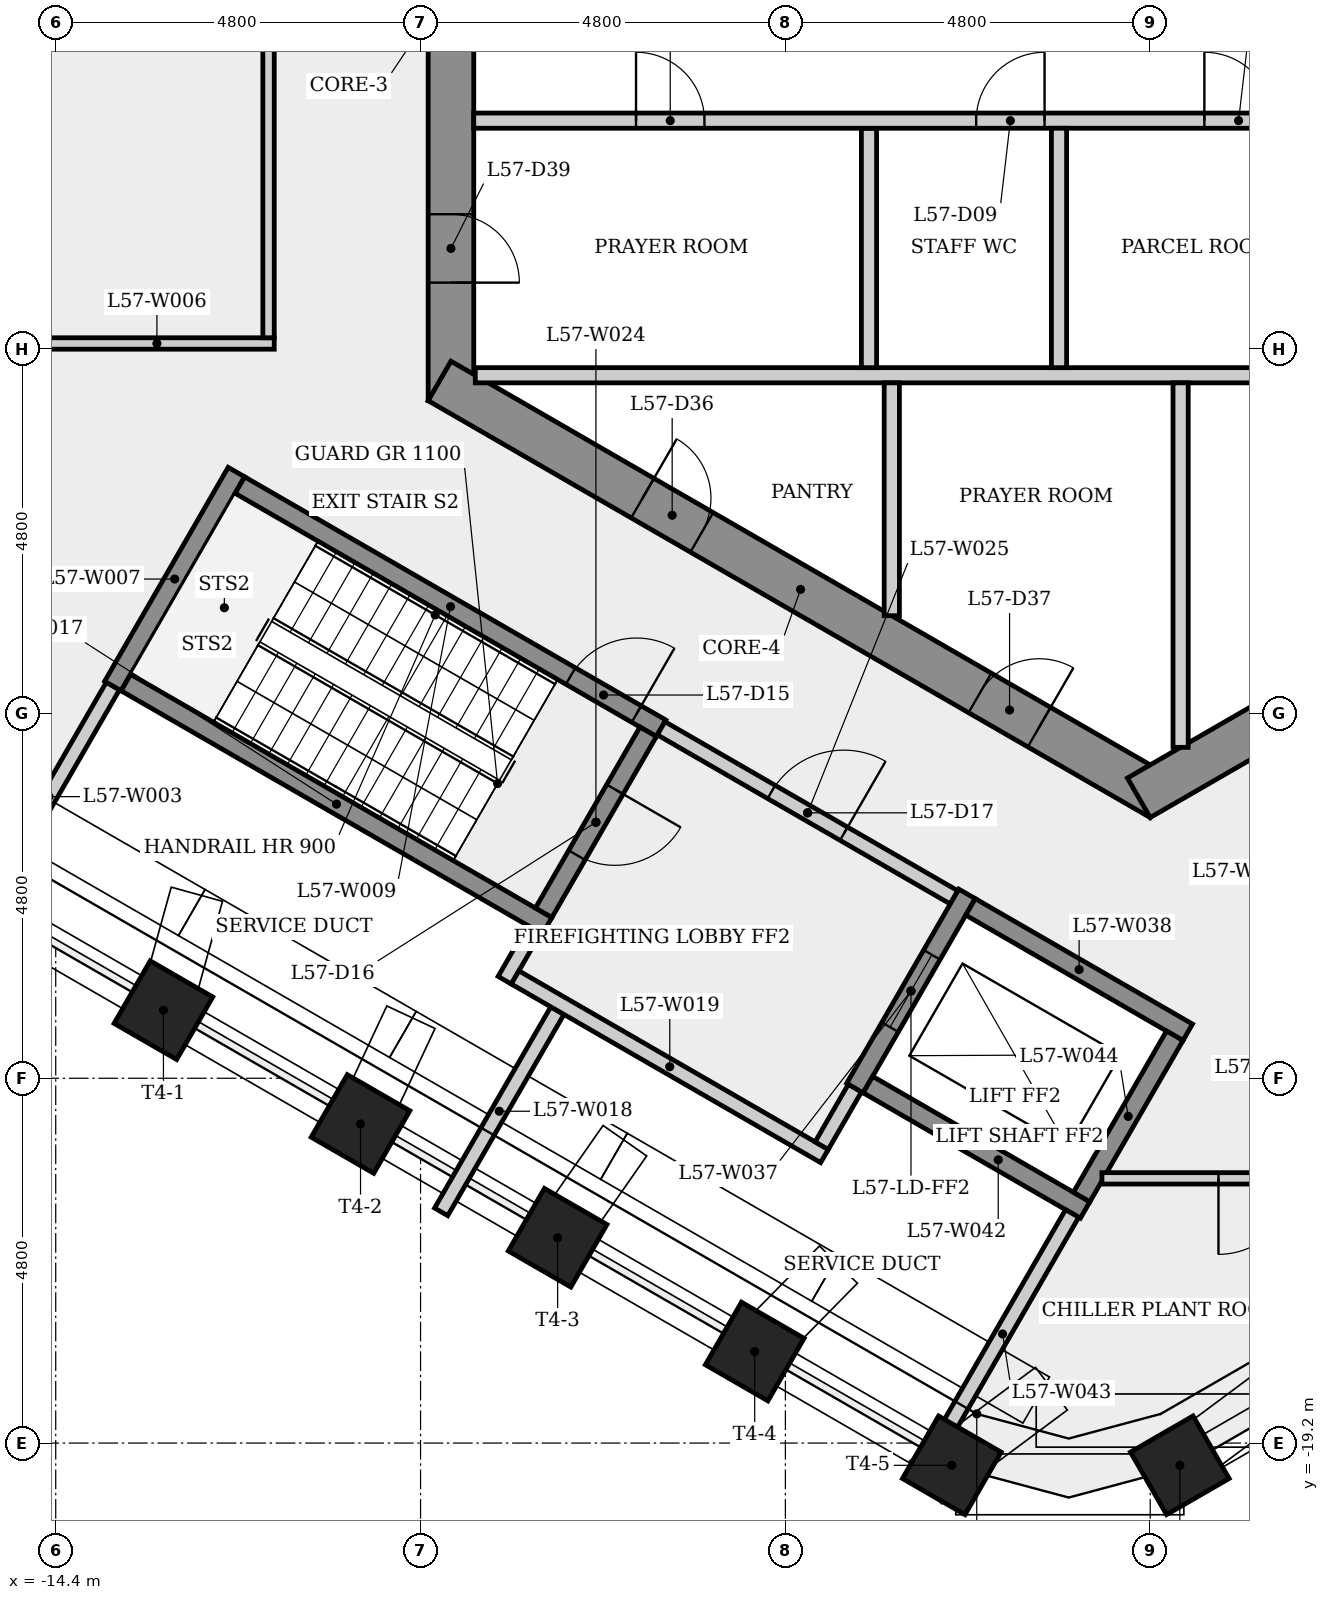
"""IFC4 building model, lengths in metres.
Left out: names, types, materials, properties, quantities, classifications, styles, units other than length and angle.
Written with IfcOpenShell. Run it as: python <this file> out.ifc"""

import sys

from ifc_helpers import new_model, si_unit, direction, frame, frame_2d, origin, origin_2d, place, context, subcontext, project, spatial, rectangle, extrude, element, fill, save


model = new_model("IFC4")
c1 = context("Model", 3, precision=1e-05, world=origin(), true_north=direction((0.0, 1.0)))
c2 = subcontext(c1, "Body", "Model", "MODEL_VIEW")
j1 = project(units=[si_unit("LENGTHUNIT", "METRE"), si_unit("PLANEANGLEUNIT", "RADIAN")], contexts=[c1])
p1 = place(None, origin())
s1 = spatial("IfcSite", under=j1, at=p1, CompositionType="ELEMENT")
p2 = place(p1, origin())
s2 = spatial("IfcBuilding", under=s1, at=p2, CompositionType="ELEMENT")
p3 = place(p2, frame((0.0, 0.0, 214.1)))
s3 = spatial("IfcBuildingStorey", under=s2, at=p3, CompositionType="ELEMENT", Elevation=214.1)
p4 = place(p3, frame((-9.2, 5.485, 0.0), z_axis=(0.0, 0.0, 1.0), x_axis=(0.0, -1.0, 0.0)))
e1 = element("IfcWall", 1, at=p4, inside=s3, PredefinedType="SHEAR", context=c2, shape_type="SweptSolid", body=[
    extrude(rectangle(XDim=10.97, YDim=0.6, at=frame_2d((5.485, 0.0))), origin(), (0.0, 0.0, 1.0), 4.8),
])
p5 = place(p4, frame((8.516, 0.0, 0.0)))
e2 = element("IfcOpeningElement", 2, at=p5, cuts=e1, PredefinedType="OPENING", context=c2, shape_type="SweptSolid", body=[
    extrude(rectangle(XDim=0.9, YDim=2.1, at=frame_2d((0.45, 1.05))), frame((0.0, 0.31, 0.0), z_axis=(0.0, -1.0, 0.0), x_axis=(1.0, 0.0, 0.0)), (0.0, 0.0, 1.0), 0.62),
])
p6 = place(p4, frame((4.685, 0.0, 0.0)))
e3 = element("IfcOpeningElement", 3, at=p6, cuts=e1, PredefinedType="OPENING", context=c2, shape_type="SweptSolid", body=[
    extrude(rectangle(XDim=1.6, YDim=2.1, at=frame_2d((0.8, 1.05))), frame((0.0, 0.31, 0.0), z_axis=(0.0, -1.0, 0.0), x_axis=(1.0, 0.0, 0.0)), (0.0, 0.0, 1.0), 0.62),
])
p7 = place(p3, frame((-9.35, -5.225, 0.0), z_axis=(0.0, 0.0, 1.0), x_axis=(0.866023993627, -0.500002442456, 0.0)))
e4 = element("IfcWall", 4, at=p7, inside=s3, PredefinedType="SHEAR", context=c2, shape_type="SweptSolid", body=[
    extrude(rectangle(XDim=10.97, YDim=0.6, at=frame_2d((5.485, 0.0))), origin(), (0.0, 0.0, 1.0), 4.8),
])
p8 = place(p7, frame((3.084, 0.0, 0.0)))
e5 = element("IfcOpeningElement", 5, at=p8, cuts=e4, PredefinedType="OPENING", context=c2, shape_type="SweptSolid", body=[
    extrude(rectangle(XDim=0.9, YDim=2.1, at=frame_2d((0.45, 1.05))), frame((0.0, 0.31, 0.0), z_axis=(0.0, -1.0, 0.0), x_axis=(1.0, 0.0, 0.0)), (0.0, 0.0, 1.0), 0.62),
])
p9 = place(p7, frame((8.21, 0.0, 0.0)))
e6 = element("IfcOpeningElement", 6, at=p9, cuts=e4, PredefinedType="OPENING", context=c2, shape_type="SweptSolid", body=[
    extrude(rectangle(XDim=0.9, YDim=2.1, at=frame_2d((0.45, 1.05))), frame((0.0, 0.31, 0.0), z_axis=(0.0, -1.0, 0.0), x_axis=(1.0, 0.0, 0.0)), (0.0, 0.0, 1.0), 0.62),
])
p10 = place(p3, frame((-0.15, -10.71, 0.0), z_axis=(0.0, 0.0, 1.0), x_axis=(0.866023993627, 0.500002442456, 0.0)))
e7 = element("IfcWall", 7, at=p10, inside=s3, PredefinedType="SHEAR", context=c2, shape_type="SweptSolid", body=[
    extrude(rectangle(XDim=10.97, YDim=0.6, at=frame_2d((5.485, 0.0))), origin(), (0.0, 0.0, 1.0), 4.8),
])
p11 = place(p10, frame((6.935, 0.0, 0.0)))
e8 = element("IfcOpeningElement", 8, at=p11, cuts=e7, PredefinedType="OPENING", context=c2, shape_type="SweptSolid", body=[
    extrude(rectangle(XDim=0.9, YDim=2.1, at=frame_2d((0.45, 1.05))), frame((0.0, 0.31, 0.0), z_axis=(0.0, -1.0, 0.0), x_axis=(1.0, 0.0, 0.0)), (0.0, 0.0, 1.0), 0.62),
])
for number, where, z_axis, x_axis in (
    (9, (-12.983, -13.504, 0.0), (0.0, 0.0, 1.0), (-0.5, -0.866, 0.0)),
    (10, (-10.39, -15.001, 0.0), (0.0, 0.0, 1.0), (-0.5, -0.866, 0.0)),
    (11, (-7.797, -16.499, 0.0), (0.0, 0.0, 1.0), (-0.5, -0.866, 0.0)),
    (12, (-5.204, -17.996, 0.0), (0.0, 0.0, 1.0), (-0.5, -0.866, 0.0)),
    (13, (-2.611, -19.493, 0.0), (0.0, 0.0, 1.0), (-0.5, -0.866, 0.0)),
    (14, (0.389, -19.493, 0.0), (0.0, 0.0, 1.0), (0.5, -0.866, 0.0)),
):
    element("IfcColumn", number, at=place(p3, frame(where, z_axis=z_axis, x_axis=x_axis)), inside=s3, PredefinedType="COLUMN", context=c2, shape_type="SweptSolid", body=[
        extrude(rectangle(XDim=0.95, YDim=0.95, at=origin_2d()), origin(), (0.0, 0.0, 1.0), 4.45),
    ])
p12 = place(p3, frame((-15.329, -12.15, 0.0), z_axis=(0.0, 0.0, 1.0), x_axis=(0.49998231768, 0.866035612436, 0.0)))
e15 = element("IfcWall", 15, at=p12, inside=s3, PredefinedType="PLUMBINGWALL", context=c2, shape_type="SweptSolid", body=[
    extrude(rectangle(XDim=3.361, YDim=0.2, at=frame_2d((1.681, 0.0))), origin(), (0.0, 0.0, 1.0), 4.45),
])
p13 = place(p3, frame((-14.612, -4.732, 0.0), z_axis=(0.0, 0.0, 1.0), x_axis=(1.0, 0.0, 0.0)))
e16 = element("IfcWall", 16, at=p13, inside=s3, PredefinedType="PARTITIONING", context=c2, shape_type="SweptSolid", body=[
    extrude(rectangle(XDim=3.087, YDim=0.15, at=frame_2d((1.544, 0.0))), origin(), (0.0, 0.0, 1.0), 4.45),
])
p14 = place(p3, frame((-13.648, -9.239, 0.0), z_axis=(0.0, 0.0, 1.0), x_axis=(0.500017246033, 0.866015446554, 0.0)))
e17 = element("IfcWall", 17, at=p14, inside=s3, PredefinedType="SHEAR", context=c2, shape_type="SweptSolid", body=[
    extrude(rectangle(XDim=3.25, YDim=0.25, at=frame_2d((1.625, 0.0))), origin(), (0.0, 0.0, 1.0), 4.45),
])
p15 = place(p3, frame((-11.977, -6.595, 0.0), z_axis=(0.0, 0.0, 1.0), x_axis=(0.866025499775, -0.499999833739, 0.0)))
e18 = element("IfcWall", 18, at=p15, inside=s3, PredefinedType="SHEAR", context=c2, shape_type="SweptSolid", body=[
    extrude(rectangle(XDim=6.4, YDim=0.25, at=frame_2d((3.2, 0.0))), origin(), (0.0, 0.0, 1.0), 4.45),
])
p16 = place(p15, frame((5.025, 0.0, 0.0)))
e19 = element("IfcOpeningElement", 19, at=p16, cuts=e18, PredefinedType="OPENING", context=c2, shape_type="SweptSolid", body=[
    extrude(rectangle(XDim=1.0, YDim=2.1, at=frame_2d((0.5, 1.05))), frame((0.0, 0.135, 0.0), z_axis=(0.0, -1.0, 0.0), x_axis=(1.0, 0.0, 0.0)), (0.0, 0.0, 1.0), 0.27),
])
p17 = place(p3, frame((-11.6, -4.657, 0.0), z_axis=(0.0, 0.0, 1.0), x_axis=(0.0, 1.0, 0.0)))
e20 = element("IfcWall", 20, at=p17, inside=s3, PredefinedType="PARTITIONING", context=c2, shape_type="SweptSolid", body=[
    extrude(rectangle(XDim=10.214, YDim=0.15, at=frame_2d((5.107, 0.0))), origin(), (0.0, 0.0, 1.0), 4.45),
])
p18 = place(p17, frame((5.698, 0.0, 0.0)))
e21 = element("IfcOpeningElement", 21, at=p18, cuts=e20, PredefinedType="OPENING", context=c2, shape_type="SweptSolid", body=[
    extrude(rectangle(XDim=1.6, YDim=2.1, at=frame_2d((0.8, 1.05))), frame((0.0, 0.085, 0.0), z_axis=(0.0, -1.0, 0.0), x_axis=(1.0, 0.0, 0.0)), (0.0, 0.0, 1.0), 0.17),
])
p19 = place(p3, frame((-8.88, -5.15, 0.0), z_axis=(0.0, 0.0, 1.0), x_axis=(1.0, 0.0, 0.0)))
e22 = element("IfcWall", 22, at=p19, inside=s3, PredefinedType="PARTITIONING", context=c2, shape_type="SweptSolid", body=[
    extrude(rectangle(XDim=11.205, YDim=0.2, at=frame_2d((5.603, 0.0))), origin(), (0.0, 0.0, 1.0), 4.45),
])
p20 = place(p3, frame((-8.493, -13.11, 0.0), z_axis=(0.0, 0.0, 1.0), x_axis=(0.500067724834, 0.865986299303, 0.0)))
e23 = element("IfcWall", 23, at=p20, inside=s3, PredefinedType="PLUMBINGWALL", context=c2, shape_type="SweptSolid", body=[
    extrude(rectangle(XDim=0.775, YDim=0.2, at=frame_2d((0.388, 0.0))), origin(), (0.0, 0.0, 1.0), 4.45),
])
p21 = place(p3, frame((-7.935, -12.393, 0.0), z_axis=(0.0, 0.0, 1.0), x_axis=(-0.866025499775, 0.499999833739, 0.0)))
e24 = element("IfcWall", 24, at=p21, inside=s3, PredefinedType="SHEAR", context=c2, shape_type="SweptSolid", body=[
    extrude(rectangle(XDim=6.4, YDim=0.25, at=frame_2d((3.2, 0.0))), origin(), (0.0, 0.0, 1.0), 4.45),
])
p22 = place(p3, frame((-7.8, -13.51, 0.0), z_axis=(0.0, 0.0, 1.0), x_axis=(-0.500003532061, -0.866023364538, 0.0)))
e25 = element("IfcWall", 25, at=p22, inside=s3, PredefinedType="PLUMBINGWALL", context=c2, shape_type="SweptSolid", body=[
    extrude(rectangle(XDim=3.058, YDim=0.2, at=frame_2d((1.529, 0.0))), origin(), (0.0, 0.0, 1.0), 4.45),
])
p23 = place(p3, frame((-8.356, -13.073, 0.0), z_axis=(0.0, 0.0, 1.0), x_axis=(0.866038532462, -0.499977259774, 0.0)))
e26 = element("IfcWall", 26, at=p23, inside=s3, PredefinedType="PLUMBINGWALL", context=c2, shape_type="SweptSolid", body=[
    extrude(rectangle(XDim=4.7, YDim=0.2, at=frame_2d((2.35, 0.0))), origin(), (0.0, 0.0, 1.0), 4.45),
])
p24 = place(p3, frame((-6.605, -9.841, 0.0), z_axis=(0.0, 0.0, 1.0), x_axis=(-0.499996545922, -0.866027397988, 0.0)))
e27 = element("IfcWall", 27, at=p24, inside=s3, PredefinedType="SHEAR", context=c2, shape_type="SweptSolid", body=[
    extrude(rectangle(XDim=2.75, YDim=0.25, at=frame_2d((1.375, 0.0))), origin(), (0.0, 0.0, 1.0), 4.45),
])
p25 = place(p24, frame((0.875, 0.0, 0.0)))
e28 = element("IfcOpeningElement", 28, at=p25, cuts=e27, PredefinedType="OPENING", context=c2, shape_type="SweptSolid", body=[
    extrude(rectangle(XDim=1.0, YDim=2.1, at=frame_2d((0.5, 1.05))), frame((0.0, 0.135, 0.0), z_axis=(0.0, -1.0, 0.0), x_axis=(1.0, 0.0, 0.0)), (0.0, 0.0, 1.0), 0.27),
])
p26 = place(p3, frame((-6.435, -9.795, 0.0), z_axis=(0.0, 0.0, 1.0), x_axis=(0.866012907634, -0.500021643343, 0.0)))
e29 = element("IfcWall", 29, at=p26, inside=s3, PredefinedType="PARTITIONING", context=c2, shape_type="SweptSolid", body=[
    extrude(rectangle(XDim=4.45, YDim=0.2, at=frame_2d((2.225, 0.0))), origin(), (0.0, 0.0, 1.0), 4.45),
])
p27 = place(p26, frame((1.675, 0.0, 0.0)))
e30 = element("IfcOpeningElement", 30, at=p27, cuts=e29, PredefinedType="OPENING", context=c2, shape_type="SweptSolid", body=[
    extrude(rectangle(XDim=1.1, YDim=2.1, at=frame_2d((0.55, 1.05))), frame((0.0, 0.11, 0.0), z_axis=(0.0, -1.0, 0.0), x_axis=(1.0, 0.0, 0.0)), (0.0, 0.0, 1.0), 0.22),
])
p28 = place(p3, frame((-3.885, -14.529, 0.0), z_axis=(0.0, 0.0, 1.0), x_axis=(-0.499859285417, -0.866106630146, 0.0)))
e31 = element("IfcWall", 31, at=p28, inside=s3, PredefinedType="PLUMBINGWALL", context=c2, shape_type="SweptSolid", body=[
    extrude(rectangle(XDim=0.875, YDim=0.2, at=frame_2d((0.438, 0.0))), origin(), (0.0, 0.0, 1.0), 4.45),
])
p29 = place(p3, frame((-3.7, -1.9, 0.0), z_axis=(0.0, 0.0, 1.0), x_axis=(0.0, -1.0, 0.0)))
e32 = element("IfcWall", 32, at=p29, inside=s3, PredefinedType="PARTITIONING", context=c2, shape_type="SweptSolid", body=[
    extrude(rectangle(XDim=3.15, YDim=0.2, at=frame_2d((1.575, 0.0))), origin(), (0.0, 0.0, 1.0), 4.45),
])
p30 = place(p3, frame((-8.9, -1.8, 0.0), z_axis=(0.0, 0.0, 1.0), x_axis=(1.0, 0.0, 0.0)))
e33 = element("IfcWall", 33, at=p30, inside=s3, PredefinedType="PARTITIONING", context=c2, shape_type="SweptSolid", body=[
    extrude(rectangle(XDim=11.225, YDim=0.2, at=frame_2d((5.613, 0.0))), origin(), (0.0, 0.0, 1.0), 4.45),
])
p31 = place(p30, frame((2.135, 0.0, 0.0)))
e34 = element("IfcOpeningElement", 34, at=p31, cuts=e33, PredefinedType="OPENING", context=c2, shape_type="SweptSolid", body=[
    extrude(rectangle(XDim=0.9, YDim=2.1, at=frame_2d((0.45, 1.05))), frame((0.0, 0.11, 0.0), z_axis=(0.0, -1.0, 0.0), x_axis=(1.0, 0.0, 0.0)), (0.0, 0.0, 1.0), 0.22),
])
p32 = place(p30, frame((6.61, 0.0, 0.0)))
e35 = element("IfcOpeningElement", 35, at=p32, cuts=e33, PredefinedType="OPENING", context=c2, shape_type="SweptSolid", body=[
    extrude(rectangle(XDim=0.9, YDim=2.1, at=frame_2d((0.45, 1.05))), frame((0.0, 0.11, 0.0), z_axis=(0.0, -1.0, 0.0), x_axis=(1.0, 0.0, 0.0)), (0.0, 0.0, 1.0), 0.22),
])
p33 = place(p30, frame((9.613, 0.0, 0.0)))
e36 = element("IfcOpeningElement", 36, at=p33, cuts=e33, PredefinedType="OPENING", context=c2, shape_type="SweptSolid", body=[
    extrude(rectangle(XDim=0.9, YDim=2.1, at=frame_2d((0.45, 1.05))), frame((0.0, 0.11, 0.0), z_axis=(0.0, -1.0, 0.0), x_axis=(1.0, 0.0, 0.0)), (0.0, 0.0, 1.0), 0.22),
])
p34 = place(p3, frame((-3.4, -5.25, 0.0), z_axis=(0.0, 0.0, 1.0), x_axis=(0.0, -1.0, 0.0)))
e37 = element("IfcWall", 37, at=p34, inside=s3, PredefinedType="PARTITIONING", context=c2, shape_type="SweptSolid", body=[
    extrude(rectangle(XDim=3.064, YDim=0.2, at=frame_2d((1.532, 0.0))), origin(), (0.0, 0.0, 1.0), 4.45),
])
p35 = place(p3, frame((-2.41, -11.974, 0.0), z_axis=(0.0, 0.0, 1.0), x_axis=(-0.500001826776, -0.866024349092, 0.0)))
e38 = element("IfcWall", 38, at=p35, inside=s3, PredefinedType="SHEAR", context=c2, shape_type="SweptSolid", body=[
    extrude(rectangle(XDim=2.95, YDim=0.25, at=frame_2d((1.475, 0.0))), origin(), (0.0, 0.0, 1.0), 4.45),
])
p36 = place(p35, frame((0.925, 0.0, 0.0)))
e39 = element("IfcOpeningElement", 39, at=p36, cuts=e38, PredefinedType="OPENING", context=c2, shape_type="SweptSolid", body=[
    extrude(rectangle(XDim=1.1, YDim=2.1, at=frame_2d((0.55, 1.05))), frame((0.0, 0.135, 0.0), z_axis=(0.0, -1.0, 0.0), x_axis=(1.0, 0.0, 0.0)), (0.0, 0.0, 1.0), 0.27),
])
p37 = place(p3, frame((-2.364, -12.145, 0.0), z_axis=(0.0, 0.0, 1.0), x_axis=(0.866040211805, -0.499974350878, 0.0)))
e40 = element("IfcWall", 40, at=p37, inside=s3, PredefinedType="SHEAR", context=c2, shape_type="SweptSolid", body=[
    extrude(rectangle(XDim=3.3, YDim=0.25, at=frame_2d((1.65, 0.0))), origin(), (0.0, 0.0, 1.0), 4.45),
])
p38 = place(p3, frame((-1.2, -1.9, 0.0), z_axis=(0.0, 0.0, 1.0), x_axis=(0.0, -1.0, 0.0)))
e41 = element("IfcWall", 41, at=p38, inside=s3, PredefinedType="PARTITIONING", context=c2, shape_type="SweptSolid", body=[
    extrude(rectangle(XDim=3.15, YDim=0.2, at=frame_2d((1.575, 0.0))), origin(), (0.0, 0.0, 1.0), 4.45),
])
p39 = place(p3, frame((-0.856, -16.133, 0.0), z_axis=(0.0, 0.0, 1.0), x_axis=(-0.866021716278, 0.500006386895, 0.0)))
e42 = element("IfcWall", 42, at=p39, inside=s3, PredefinedType="SHEAR", context=c2, shape_type="SweptSolid", body=[
    extrude(rectangle(XDim=3.3, YDim=0.25, at=frame_2d((1.65, 0.0))), origin(), (0.0, 0.0, 1.0), 4.45),
])
p40 = place(p3, frame((-1.027, -16.179, 0.0), z_axis=(0.0, 0.0, 1.0), x_axis=(-0.499989866495, -0.866031254287, 0.0)))
e43 = element("IfcWall", 43, at=p40, inside=s3, PredefinedType="PLUMBINGWALL", context=c2, shape_type="SweptSolid", body=[
    extrude(rectangle(XDim=3.662, YDim=0.2, at=frame_2d((1.831, 0.0))), origin(), (0.0, 0.0, 1.0), 4.45),
])
p41 = place(p3, frame((-0.902, -15.962, 0.0), z_axis=(0.0, 0.0, 1.0), x_axis=(0.500061746146, 0.865989751695, 0.0)))
e44 = element("IfcWall", 44, at=p41, inside=s3, PredefinedType="SHEAR", context=c2, shape_type="SweptSolid", body=[
    extrude(rectangle(XDim=2.45, YDim=0.25, at=frame_2d((1.225, 0.0))), origin(), (0.0, 0.0, 1.0), 4.8),
])
p42 = place(p3, frame((0.4, -5.25, 0.0), z_axis=(0.0, 0.0, 1.0), x_axis=(0.0, -1.0, 0.0)))
e45 = element("IfcWall", 45, at=p42, inside=s3, PredefinedType="PARTITIONING", context=c2, shape_type="SweptSolid", body=[
    extrude(rectangle(XDim=4.796, YDim=0.2, at=frame_2d((2.398, 0.0))), origin(), (0.0, 0.0, 1.0), 4.45),
])
p43 = place(p3, frame((3.432, -15.717, 0.0), z_axis=(0.0, 0.0, 1.0), x_axis=(-1.0, 0.0, 0.0)))
e46 = element("IfcWall", 46, at=p43, inside=s3, PredefinedType="PARTITIONING", context=c2, shape_type="SweptSolid", body=[
    extrude(rectangle(XDim=4.067, YDim=0.15, at=frame_2d((2.034, 0.0))), origin(), (0.0, 0.0, 1.0), 4.45),
])
p44 = place(p43, frame((1.534, 0.0, 0.0)))
e47 = element("IfcOpeningElement", 47, at=p44, cuts=e46, PredefinedType="OPENING", context=c2, shape_type="SweptSolid", body=[
    extrude(rectangle(XDim=1.0, YDim=2.1, at=frame_2d((0.5, 1.05))), frame((0.0, 0.085, 0.0), z_axis=(0.0, -1.0, 0.0), x_axis=(1.0, 0.0, 0.0)), (0.0, 0.0, 1.0), 0.17),
])
p45 = place(p31, origin())
e48 = element("IfcDoor", 48, at=p45, inside=s3, OperationType="SINGLE_SWING_LEFT", PredefinedType="DOOR", context=c2, shape_type="SweptSolid", body=[
    extrude(rectangle(XDim=0.9, YDim=2.1, at=frame_2d((0.45, 1.05))), frame((0.0, 0.025, 0.0), z_axis=(0.0, -1.0, 0.0), x_axis=(1.0, 0.0, 0.0)), (0.0, 0.0, 1.0), 0.05),
])
fill(e34, e48)
p46 = place(p32, origin())
e49 = element("IfcDoor", 49, at=p46, inside=s3, OperationType="SINGLE_SWING_RIGHT", PredefinedType="DOOR", context=c2, shape_type="SweptSolid", body=[
    extrude(rectangle(XDim=0.9, YDim=2.1, at=frame_2d((0.45, 1.05))), frame((0.0, 0.025, 0.0), z_axis=(0.0, -1.0, 0.0), x_axis=(1.0, 0.0, 0.0)), (0.0, 0.0, 1.0), 0.05),
])
fill(e35, e49)
p47 = place(p33, origin())
e50 = element("IfcDoor", 50, at=p47, inside=s3, OperationType="SINGLE_SWING_LEFT", PredefinedType="DOOR", context=c2, shape_type="SweptSolid", body=[
    extrude(rectangle(XDim=0.9, YDim=2.1, at=frame_2d((0.45, 1.05))), frame((0.0, 0.025, 0.0), z_axis=(0.0, -1.0, 0.0), x_axis=(1.0, 0.0, 0.0)), (0.0, 0.0, 1.0), 0.05),
])
fill(e36, e50)
p48 = place(p16, origin())
e51 = element("IfcDoor", 51, at=p48, inside=s3, OperationType="SINGLE_SWING_RIGHT", PredefinedType="DOOR", context=c2, shape_type="SweptSolid", body=[
    extrude(rectangle(XDim=1.0, YDim=2.1, at=frame_2d((0.5, 1.05))), frame((0.0, 0.025, 0.0), z_axis=(0.0, -1.0, 0.0), x_axis=(1.0, 0.0, 0.0)), (0.0, 0.0, 1.0), 0.05),
])
fill(e19, e51)
p49 = place(p25, origin())
e52 = element("IfcDoor", 52, at=p49, inside=s3, OperationType="SINGLE_SWING_LEFT", PredefinedType="DOOR", context=c2, shape_type="SweptSolid", body=[
    extrude(rectangle(XDim=1.0, YDim=2.1, at=frame_2d((0.5, 1.05))), frame((0.0, 0.025, 0.0), z_axis=(0.0, -1.0, 0.0), x_axis=(1.0, 0.0, 0.0)), (0.0, 0.0, 1.0), 0.05),
])
fill(e28, e52)
p50 = place(p27, origin())
e53 = element("IfcDoor", 53, at=p50, inside=s3, OperationType="SINGLE_SWING_RIGHT", PredefinedType="DOOR", context=c2, shape_type="SweptSolid", body=[
    extrude(rectangle(XDim=1.1, YDim=2.1, at=frame_2d((0.55, 1.05))), frame((0.0, 0.025, 0.0), z_axis=(0.0, -1.0, 0.0), x_axis=(1.0, 0.0, 0.0)), (0.0, 0.0, 1.0), 0.05),
])
fill(e30, e53)
p51 = place(p36, origin())
e54 = element("IfcDoor", 54, at=p51, inside=s3, OperationType="SLIDING_TO_LEFT", PredefinedType="DOOR", context=c2, shape_type="SweptSolid", body=[
    extrude(rectangle(XDim=1.1, YDim=2.1, at=frame_2d((0.55, 1.05))), frame((0.0, 0.025, 0.0), z_axis=(0.0, -1.0, 0.0), x_axis=(1.0, 0.0, 0.0)), (0.0, 0.0, 1.0), 0.05),
])
fill(e39, e54)
p52 = place(p44, origin())
e55 = element("IfcDoor", 55, at=p52, inside=s3, OperationType="SINGLE_SWING_RIGHT", PredefinedType="DOOR", context=c2, shape_type="SweptSolid", body=[
    extrude(rectangle(XDim=1.0, YDim=2.1, at=frame_2d((0.5, 1.05))), frame((0.0, 0.025, 0.0), z_axis=(0.0, -1.0, 0.0), x_axis=(1.0, 0.0, 0.0)), (0.0, 0.0, 1.0), 0.05),
])
fill(e47, e55)
p53 = place(p8, origin())
e56 = element("IfcDoor", 56, at=p53, inside=s3, OperationType="SINGLE_SWING_LEFT", PredefinedType="DOOR", context=c2, shape_type="SweptSolid", body=[
    extrude(rectangle(XDim=0.9, YDim=2.1, at=frame_2d((0.45, 1.05))), frame((0.0, 0.025, 0.0), z_axis=(0.0, -1.0, 0.0), x_axis=(1.0, 0.0, 0.0)), (0.0, 0.0, 1.0), 0.05),
])
fill(e5, e56)
p54 = place(p9, origin())
e57 = element("IfcDoor", 57, at=p54, inside=s3, OperationType="SINGLE_SWING_RIGHT", PredefinedType="DOOR", context=c2, shape_type="SweptSolid", body=[
    extrude(rectangle(XDim=0.9, YDim=2.1, at=frame_2d((0.45, 1.05))), frame((0.0, 0.025, 0.0), z_axis=(0.0, -1.0, 0.0), x_axis=(1.0, 0.0, 0.0)), (0.0, 0.0, 1.0), 0.05),
])
fill(e6, e57)
p55 = place(p5, origin())
e58 = element("IfcDoor", 58, at=p55, inside=s3, OperationType="SINGLE_SWING_RIGHT", PredefinedType="DOOR", context=c2, shape_type="SweptSolid", body=[
    extrude(rectangle(XDim=0.9, YDim=2.1, at=frame_2d((0.45, 1.05))), frame((0.0, 0.025, 0.0), z_axis=(0.0, -1.0, 0.0), x_axis=(1.0, 0.0, 0.0)), (0.0, 0.0, 1.0), 0.05),
])
fill(e2, e58)
save(model, sys.argv[1])
